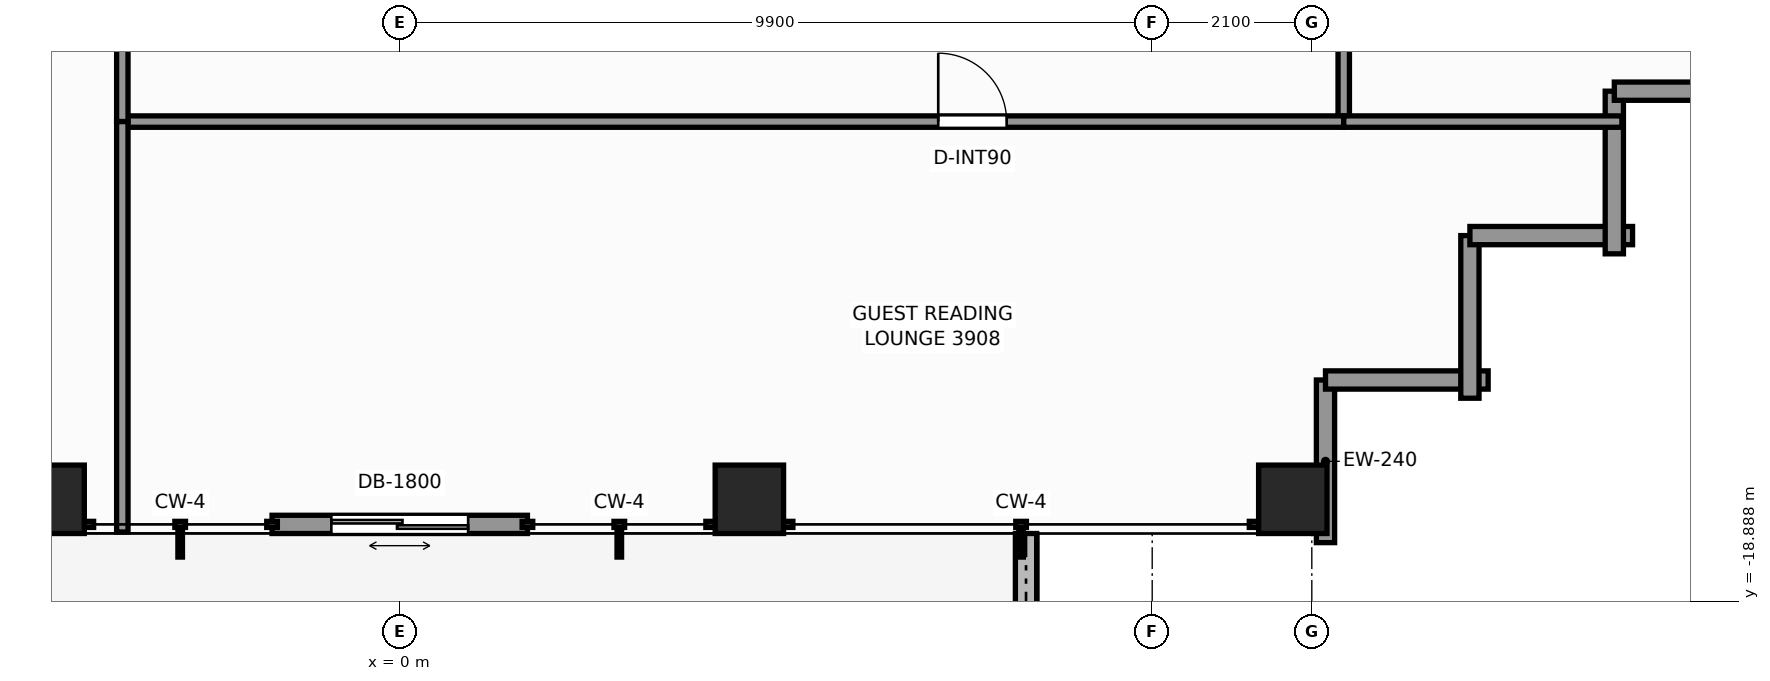
"""IFC4 building model, lengths in metres.
Left out: names, types, materials, properties, quantities, classifications, styles, units other than length and angle.
Written with IfcOpenShell. Run it as: python <this file> out.ifc"""

import sys

from ifc_helpers import new_model, si_unit, direction, frame, frame_2d, origin, origin_2d, place, context, subcontext, project, spatial, rectangle, extrude, element, fill, save


model = new_model("IFC4")
c1 = context("Model", 3, precision=1e-05, world=origin(), true_north=direction((0.0, 1.0)))
c2 = subcontext(c1, "Body", "Model", "MODEL_VIEW")
j1 = project(units=[si_unit("LENGTHUNIT", "METRE"), si_unit("PLANEANGLEUNIT", "RADIAN")], contexts=[c1])
p1 = place(None, origin())
s1 = spatial("IfcSite", under=j1, at=p1, CompositionType="ELEMENT")
p2 = place(p1, origin())
s2 = spatial("IfcBuilding", under=s1, at=p2, CompositionType="ELEMENT")
p3 = place(p2, frame((0.0, 0.0, 134.9)))
s3 = spatial("IfcBuildingStorey", under=s2, at=p3, CompositionType="ELEMENT", Elevation=134.9)
for number, where, z_axis, x_axis in (
    (1, (-4.6, -17.55, 0.0), (0.0, 0.0, 1.0), (1.0, 0.0, 0.0)),
    (2, (4.6, -17.55, 0.0), (0.0, 0.0, 1.0), (1.0, 0.0, 0.0)),
    (3, (11.75, -17.55, 0.0), (0.0, 0.0, 1.0), (1.0, 0.0, 0.0)),
):
    element("IfcColumn", number, at=place(p3, frame(where, z_axis=z_axis, x_axis=x_axis)), inside=s3, PredefinedType="COLUMN", context=c2, shape_type="SweptSolid", body=[
        extrude(rectangle(XDim=0.9, YDim=0.9, at=origin_2d()), origin(), (0.0, 0.0, 1.0), 3.3),
    ])
p4 = place(p3, frame((8.24, -19.466, -0.02), z_axis=(0.0, 0.0, 1.0), x_axis=(0.0, 1.0, 0.0)))
e4 = element("IfcWall", 4, at=p4, inside=s3, PredefinedType="PARAPET", context=c2, shape_type="SweptSolid", body=[
    extrude(rectangle(XDim=1.466, YDim=0.28, at=frame_2d((0.733, 0.0))), origin(), (0.0, 0.0, 1.0), 0.42),
])
p5 = place(p3, frame((1.68, -17.88, 0.0), z_axis=(0.0, 0.0, 1.0), x_axis=(-1.0, 0.0, 0.0)))
e5 = element("IfcWall", 5, at=p5, inside=s3, PredefinedType="STANDARD", context=c2, shape_type="SweptSolid", body=[
    extrude(rectangle(XDim=3.36, YDim=0.24, at=frame_2d((1.68, 0.0))), origin(), (0.0, 0.0, 1.0), 3.1),
])
p6 = place(p5, frame((0.78, 0.0, 0.0)))
e6 = element("IfcOpeningElement", 6, at=p6, cuts=e5, PredefinedType="OPENING", context=c2, shape_type="SweptSolid", body=[
    extrude(rectangle(XDim=1.8, YDim=2.2, at=frame_2d((0.9, 1.1))), frame((0.0, 0.13, 0.0), z_axis=(0.0, -1.0, 0.0), x_axis=(1.0, 0.0, 0.0)), (0.0, 0.0, 1.0), 0.26),
])
for number, where, z_axis, x_axis in (
    (7, (12.18, -15.98, 0.0), (0.0, 0.0, 1.0), (0.0, -1.0, 0.0)),
    (8, (14.32, -15.98, 0.0), (0.0, 0.0, 1.0), (-1.0, 0.0, 0.0)),
):
    element("IfcWall", number, at=place(p3, frame(where, z_axis=z_axis, x_axis=x_axis)), inside=s3, PredefinedType="STANDARD", context=c2, shape_type="SweptSolid", body=[
        extrude(rectangle(XDim=2.14, YDim=0.24, at=frame_2d((1.07, 0.0))), origin(), (0.0, 0.0, 1.0), 2.479),
    ])
for number, where, z_axis, x_axis in (
    (9, (14.08, -14.08, 0.0), (0.0, 0.0, 1.0), (0.0, -1.0, 0.0)),
    (10, (16.22, -14.08, 0.0), (0.0, 0.0, 1.0), (-1.0, 0.0, 0.0)),
):
    element("IfcWall", number, at=place(p3, frame(where, z_axis=z_axis, x_axis=x_axis)), inside=s3, PredefinedType="STANDARD", context=c2, shape_type="SweptSolid", body=[
        extrude(rectangle(XDim=2.14, YDim=0.24, at=frame_2d((1.07, 0.0))), origin(), (0.0, 0.0, 1.0), 2.479),
    ])
for number, where, z_axis, x_axis in (
    (11, (15.98, -12.18, 0.0), (0.0, 0.0, 1.0), (0.0, -1.0, 0.0)),
    (12, (18.12, -12.18, 0.0), (0.0, 0.0, 1.0), (-1.0, 0.0, 0.0)),
):
    element("IfcWall", number, at=place(p3, frame(where, z_axis=z_axis, x_axis=x_axis)), inside=s3, PredefinedType="STANDARD", context=c2, shape_type="SweptSolid", body=[
        extrude(rectangle(XDim=2.14, YDim=0.24, at=frame_2d((1.07, 0.0))), origin(), (0.0, 0.0, 1.0), 2.479),
    ])
p7 = place(p3, frame((12.42, -12.58, 0.0), z_axis=(0.0, 0.0, 1.0), x_axis=(0.0, 1.0, 0.0)))
e13 = element("IfcWall", 13, at=p7, inside=s3, PredefinedType="PARTITIONING", context=c2, shape_type="SweptSolid", body=[
    extrude(rectangle(XDim=24.84, YDim=0.15, at=frame_2d((12.42, 0.0))), origin(), (0.0, 0.0, 1.0), 2.312),
])
p8 = place(p7, frame((4.595, 0.0, 0.0)))
e14 = element("IfcOpeningElement", 14, at=p8, cuts=e13, PredefinedType="OPENING", context=c2, shape_type="SweptSolid", body=[
    extrude(rectangle(XDim=0.9, YDim=2.06, at=frame_2d((0.45, 1.03))), frame((0.0, 0.085, 0.0), z_axis=(0.0, -1.0, 0.0), x_axis=(1.0, 0.0, 0.0)), (0.0, 0.0, 1.0), 0.17),
])
p9 = place(p7, frame((19.665, 0.0, 0.0)))
e15 = element("IfcOpeningElement", 15, at=p9, cuts=e13, PredefinedType="OPENING", context=c2, shape_type="SweptSolid", body=[
    extrude(rectangle(XDim=0.9, YDim=2.06, at=frame_2d((0.45, 1.03))), frame((0.0, 0.085, 0.0), z_axis=(0.0, -1.0, 0.0), x_axis=(1.0, 0.0, 0.0)), (0.0, 0.0, 1.0), 0.17),
])
p10 = place(p3, frame((-3.65, -12.58, 0.0), z_axis=(0.0, 0.0, 1.0), x_axis=(1.0, 0.0, 0.0)))
e16 = element("IfcWall", 16, at=p10, inside=s3, PredefinedType="PARTITIONING", context=c2, shape_type="SweptSolid", body=[
    extrude(rectangle(XDim=16.07, YDim=0.15, at=frame_2d((8.035, 0.0))), origin(), (0.0, 0.0, 1.0), 2.312),
])
p11 = place(p10, frame((10.735, 0.0, 0.0)))
e17 = element("IfcOpeningElement", 17, at=p11, cuts=e16, PredefinedType="OPENING", context=c2, shape_type="SweptSolid", body=[
    extrude(rectangle(XDim=0.9, YDim=2.06, at=frame_2d((0.45, 1.03))), frame((0.0, 0.085, 0.0), z_axis=(0.0, -1.0, 0.0), x_axis=(1.0, 0.0, 0.0)), (0.0, 0.0, 1.0), 0.17),
])
p12 = place(p3, frame((-3.65, -12.58, 0.0), z_axis=(0.0, 0.0, 1.0), x_axis=(0.0, 1.0, 0.0)))
e18 = element("IfcWall", 18, at=p12, inside=s3, PredefinedType="PARTITIONING", context=c2, shape_type="SweptSolid", body=[
    extrude(rectangle(XDim=2.68, YDim=0.15, at=frame_2d((1.34, 0.0))), origin(), (0.0, 0.0, 1.0), 3.1),
])
p13 = place(p3, frame((12.42, -12.58, 0.0), z_axis=(0.0, 0.0, 1.0), x_axis=(1.0, 0.0, 0.0)))
e19 = element("IfcWall", 19, at=p13, inside=s3, PredefinedType="PARTITIONING", context=c2, shape_type="SweptSolid", body=[
    extrude(rectangle(XDim=3.66, YDim=0.15, at=frame_2d((1.83, 0.0))), origin(), (0.0, 0.0, 1.0), 3.1),
])
p14 = place(p3, frame((-3.65, -17.98, 0.0), z_axis=(0.0, 0.0, 1.0), x_axis=(0.0, 1.0, 0.0)))
e20 = element("IfcWall", 20, at=p14, inside=s3, PredefinedType="PARTITIONING", context=c2, shape_type="SweptSolid", body=[
    extrude(rectangle(XDim=5.4, YDim=0.15, at=frame_2d((2.7, 0.0))), origin(), (0.0, 0.0, 1.0), 2.469),
])
p15 = place(p6, origin())
e21 = element("IfcDoor", 21, at=p15, inside=s3, OperationType="DOUBLE_DOOR_SLIDING", PredefinedType="DOOR", context=c2, shape_type="SweptSolid", body=[
    extrude(rectangle(XDim=1.8, YDim=2.2, at=frame_2d((0.9, 1.1))), frame((0.0, 0.025, 0.0), z_axis=(0.0, -1.0, 0.0), x_axis=(1.0, 0.0, 0.0)), (0.0, 0.0, 1.0), 0.05),
])
fill(e6, e21)
p16 = place(p11, origin())
e22 = element("IfcDoor", 22, at=p16, inside=s3, OperationType="SINGLE_SWING_LEFT", PredefinedType="DOOR", context=c2, shape_type="SweptSolid", body=[
    extrude(rectangle(XDim=0.9, YDim=2.06, at=frame_2d((0.45, 1.03))), frame((0.0, 0.025, 0.0), z_axis=(0.0, -1.0, 0.0), x_axis=(1.0, 0.0, 0.0)), (0.0, 0.0, 1.0), 0.05),
])
fill(e17, e22)
save(model, sys.argv[1])
